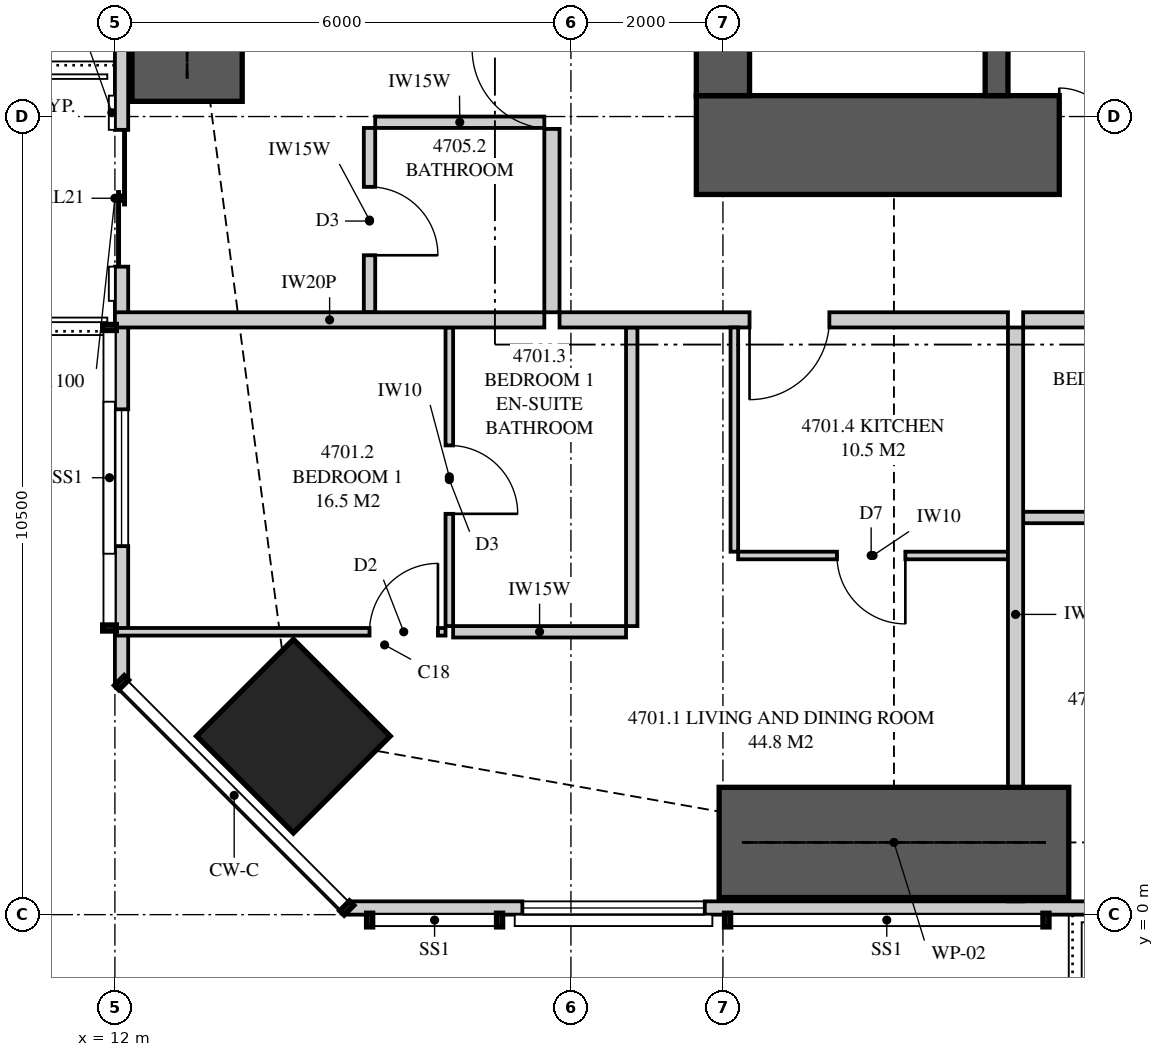
"""IFC4 building model, lengths in metres.
Left out: names, types, materials, properties, quantities, classifications, styles, units other than length and angle.
Written with IfcOpenShell. Run it as: python <this file> out.ifc"""

import sys

from ifc_helpers import new_model, si_unit, direction, frame, frame_2d, origin, origin_2d, place, context, subcontext, project, spatial, polyline, rectangle, outline, extrude, element, fill, save


model = new_model("IFC4")
c1 = context("Model", 3, precision=1e-05, world=origin(), true_north=direction((0.0, 1.0)))
c2 = subcontext(c1, "Body", "Model", "MODEL_VIEW")
j1 = project(units=[si_unit("LENGTHUNIT", "METRE"), si_unit("PLANEANGLEUNIT", "RADIAN")], contexts=[c1])
p1 = place(None, origin())
s1 = spatial("IfcSite", under=j1, at=p1, CompositionType="ELEMENT")
p2 = place(p1, origin())
s2 = spatial("IfcBuilding", under=s1, at=p2, CompositionType="ELEMENT")
p3 = place(p2, frame((0.0, 0.0, 174.45)))
s3 = spatial("IfcBuildingStorey", under=s2, at=p3, CompositionType="ELEMENT", Elevation=174.45)
p4 = place(p3, frame((14.348, 2.348, 0.0), z_axis=(0.0, 0.0, 1.0), x_axis=(0.707106781187, 0.707106781187, 0.0)))
e1 = element("IfcColumn", 1, at=p4, inside=s3, PredefinedType="COLUMN", context=c2, shape_type="SweptSolid", body=[
    extrude(rectangle(XDim=1.8, YDim=1.8, at=origin_2d()), origin(), (0.0, 0.0, 1.0), 3.35),
])
p5 = place(p3, frame((19.65, 10.125, 0.0), z_axis=(0.0, 0.0, 1.0), x_axis=(1.0, 0.0, 0.0)))
e2 = element("IfcWall", 2, at=p5, inside=s3, PredefinedType="SHEAR", context=c2, shape_type="SweptSolid", body=[
    extrude(rectangle(XDim=6.35, YDim=1.3, at=frame_2d((3.175, 0.0))), origin(), (0.0, 0.0, 1.0), 3.35),
])
p6 = place(p5, frame((4.775, 0.0, 0.0)))
e3 = element("IfcOpeningElement", 3, at=p6, cuts=e2, PredefinedType="OPENING", context=c2, shape_type="SweptSolid", body=[
    extrude(rectangle(XDim=0.75, YDim=2.1, at=frame_2d((0.375, 1.05))), frame((0.0, 0.66, 0.0), z_axis=(0.0, -1.0, 0.0), x_axis=(1.0, 0.0, 0.0)), (0.0, 0.0, 1.0), 1.32),
])
p7 = place(p3, frame((20.0, 13.0, 0.0), z_axis=(0.0, 0.0, 1.0), x_axis=(0.0, -1.0, 0.0)))
e4 = element("IfcWall", 4, at=p7, inside=s3, PredefinedType="SHEAR", context=c2, shape_type="SweptSolid", body=[
    extrude(rectangle(XDim=2.225, YDim=0.7, at=frame_2d((1.113, 0.0))), origin(), (0.0, 0.0, 1.0), 3.35),
])
p8 = place(p3, frame((23.6, 10.775, 0.0), z_axis=(0.0, 0.0, 1.0), x_axis=(0.0, 1.0, 0.0)))
e5 = element("IfcWall", 5, at=p8, inside=s3, PredefinedType="SHEAR", context=c2, shape_type="SweptSolid", body=[
    extrude(rectangle(XDim=6.925, YDim=0.3, at=frame_2d((3.462, 0.0))), origin(), (0.0, 0.0, 1.0), 3.35),
])
p9 = place(p3, frame((15.051, 0.087, 0.0), z_axis=(0.0, 0.0, 1.0), x_axis=(1.0, 0.0, 0.0)))
e6 = element("IfcWall", 6, at=p9, inside=s3, PredefinedType="SOLIDWALL", context=c2, shape_type="SweptSolid", body=[
    extrude(outline(polyline([(0.0, 0.0), (34.897, 0.0), (34.897, 3.11), (27.91, 3.11), (27.91, 2.15), (27.836, 2.15), (27.836, 3.11), (27.699, 3.11), (27.699, 2.15), (7.199, 2.15), (7.199, 3.11), (7.062, 3.11), (7.062, 2.15), (6.987, 2.15), (6.987, 3.11), (0.0, 3.11), (0.0, 0.0)])), frame((0.0, 0.087, 0.0), z_axis=(0.0, -1.0, 0.0), x_axis=(1.0, 0.0, 0.0)), (0.0, 0.0, 1.0), 0.175),
])
p10 = place(p9, frame((2.31, 0.0, 0.4)))
e7 = element("IfcOpeningElement", 7, at=p10, cuts=e6, PredefinedType="OPENING", context=c2, shape_type="SweptSolid", body=[
    extrude(rectangle(XDim=2.4, YDim=1.7, at=frame_2d((1.2, 0.85))), frame((0.0, 0.097, 0.0), z_axis=(0.0, -1.0, 0.0), x_axis=(1.0, 0.0, 0.0)), (0.0, 0.0, 1.0), 0.195),
])
p11 = place(p9, frame((10.399, 0.0, 0.0)))
e8 = element("IfcOpeningElement", 8, at=p11, cuts=e6, PredefinedType="OPENING", context=c2, shape_type="SweptSolid", body=[
    extrude(rectangle(XDim=1.8, YDim=2.1, at=frame_2d((0.9, 1.05))), frame((0.0, 0.097, 0.0), z_axis=(0.0, -1.0, 0.0), x_axis=(1.0, 0.0, 0.0)), (0.0, 0.0, 1.0), 0.195),
])
p12 = place(p9, frame((12.649, 0.0, 0.4)))
e9 = element("IfcOpeningElement", 9, at=p12, cuts=e6, PredefinedType="OPENING", context=c2, shape_type="SweptSolid", body=[
    extrude(rectangle(XDim=2.4, YDim=1.7, at=frame_2d((1.2, 0.85))), frame((0.0, 0.097, 0.0), z_axis=(0.0, -1.0, 0.0), x_axis=(1.0, 0.0, 0.0)), (0.0, 0.0, 1.0), 0.195),
])
p13 = place(p9, frame((19.874, 0.0, 0.4)))
e10 = element("IfcOpeningElement", 10, at=p13, cuts=e6, PredefinedType="OPENING", context=c2, shape_type="SweptSolid", body=[
    extrude(rectangle(XDim=1.8, YDim=1.7, at=frame_2d((0.9, 0.85))), frame((0.0, 0.097, 0.0), z_axis=(0.0, -1.0, 0.0), x_axis=(1.0, 0.0, 0.0)), (0.0, 0.0, 1.0), 0.195),
])
p14 = place(p9, frame((22.799, 0.0, 0.0)))
e11 = element("IfcOpeningElement", 11, at=p14, cuts=e6, PredefinedType="OPENING", context=c2, shape_type="SweptSolid", body=[
    extrude(rectangle(XDim=1.8, YDim=2.1, at=frame_2d((0.9, 1.05))), frame((0.0, 0.097, 0.0), z_axis=(0.0, -1.0, 0.0), x_axis=(1.0, 0.0, 0.0)), (0.0, 0.0, 1.0), 0.195),
])
p15 = place(p9, frame((30.205, 0.0, 0.4)))
e12 = element("IfcOpeningElement", 12, at=p15, cuts=e6, PredefinedType="OPENING", context=c2, shape_type="SweptSolid", body=[
    extrude(rectangle(XDim=2.4, YDim=1.7, at=frame_2d((1.2, 0.85))), frame((0.0, 0.097, 0.0), z_axis=(0.0, -1.0, 0.0), x_axis=(1.0, 0.0, 0.0)), (0.0, 0.0, 1.0), 0.195),
])
p16 = place(p3, frame((12.087, 32.949, 0.0), z_axis=(0.0, 0.0, 1.0), x_axis=(0.0, -1.0, 0.0)))
e13 = element("IfcWall", 13, at=p16, inside=s3, PredefinedType="SOLIDWALL", context=c2, shape_type="SweptSolid", body=[
    extrude(outline(polyline([(0.0, 0.0), (29.897, 0.0), (29.897, 3.11), (20.191, 3.11), (20.191, 2.15), (20.051, 2.15), (20.051, 3.11), (19.949, 3.11), (19.949, 2.15), (7.949, 2.15), (7.949, 3.11), (7.823, 3.11), (7.823, 2.15), (7.73, 2.15), (7.73, 3.11), (0.0, 3.11), (0.0, 0.0)])), frame((0.0, 0.087, 0.0), z_axis=(0.0, -1.0, 0.0), x_axis=(1.0, 0.0, 0.0)), (0.0, 0.0, 1.0), 0.175),
])
p17 = place(p16, frame((1.237, 0.0, 0.4)))
e14 = element("IfcOpeningElement", 14, at=p17, cuts=e13, PredefinedType="OPENING", context=c2, shape_type="SweptSolid", body=[
    extrude(rectangle(XDim=1.2, YDim=1.7, at=frame_2d((0.6, 0.85))), frame((0.0, 0.097, 0.0), z_axis=(0.0, -1.0, 0.0), x_axis=(1.0, 0.0, 0.0)), (0.0, 0.0, 1.0), 0.195),
])
p18 = place(p16, frame((10.482, 0.0, 0.4)))
e15 = element("IfcOpeningElement", 15, at=p18, cuts=e13, PredefinedType="OPENING", context=c2, shape_type="SweptSolid", body=[
    extrude(rectangle(XDim=2.4, YDim=1.7, at=frame_2d((1.2, 0.85))), frame((0.0, 0.097, 0.0), z_axis=(0.0, -1.0, 0.0), x_axis=(1.0, 0.0, 0.0)), (0.0, 0.0, 1.0), 0.195),
])
p19 = place(p16, frame((15.735, 0.0, 0.4)))
e16 = element("IfcOpeningElement", 16, at=p19, cuts=e13, PredefinedType="OPENING", context=c2, shape_type="SweptSolid", body=[
    extrude(rectangle(XDim=1.8, YDim=1.7, at=frame_2d((0.9, 0.85))), frame((0.0, 0.097, 0.0), z_axis=(0.0, -1.0, 0.0), x_axis=(1.0, 0.0, 0.0)), (0.0, 0.0, 1.0), 0.195),
])
p20 = place(p16, frame((22.624, 0.0, 0.0)))
e17 = element("IfcOpeningElement", 17, at=p20, cuts=e13, PredefinedType="OPENING", context=c2, shape_type="SweptSolid", body=[
    extrude(rectangle(XDim=1.8, YDim=2.1, at=frame_2d((0.9, 1.05))), frame((0.0, 0.097, 0.0), z_axis=(0.0, -1.0, 0.0), x_axis=(1.0, 0.0, 0.0)), (0.0, 0.0, 1.0), 0.195),
])
p21 = place(p16, frame((26.301, 0.0, 0.4)))
e18 = element("IfcOpeningElement", 18, at=p21, cuts=e13, PredefinedType="OPENING", context=c2, shape_type="SweptSolid", body=[
    extrude(rectangle(XDim=1.8, YDim=1.7, at=frame_2d((0.9, 0.85))), frame((0.0, 0.097, 0.0), z_axis=(0.0, -1.0, 0.0), x_axis=(1.0, 0.0, 0.0)), (0.0, 0.0, 1.0), 0.195),
])
p22 = place(p3, frame((23.85, 0.175, 0.0), z_axis=(0.0, 0.0, 1.0), x_axis=(0.0, 1.0, 0.0)))
e19 = element("IfcWall", 19, at=p22, inside=s3, PredefinedType="PARTITIONING", context=c2, shape_type="SweptSolid", body=[
    extrude(outline(polyline([(0.529, 2.15), (0.0, 2.15), (0.0, 0.0), (0.529, 0.0), (0.529, 0.207), (1.021, 0.207), (1.021, 0.0), (7.55, 0.0), (7.55, 3.11), (1.685, 3.11), (1.685, 2.15), (1.021, 2.15), (1.021, 1.944), (0.529, 1.944), (0.529, 2.15)])), frame((0.0, 0.1, 0.0), z_axis=(0.0, -1.0, 0.0), x_axis=(1.0, 0.0, 0.0)), (0.0, 0.0, 1.0), 0.2),
])
p23 = place(p3, frame((17.85, 7.825, 0.0), z_axis=(0.0, 0.0, 1.0), x_axis=(1.0, 0.0, 0.0)))
e20 = element("IfcWall", 20, at=p23, inside=s3, PredefinedType="PARTITIONING", context=c2, shape_type="SweptSolid", body=[
    extrude(outline(polyline([(0.0, 0.0), (5.9, 0.0), (5.9, 3.11), (4.737, 3.11), (4.737, 2.541), (4.062, 2.541), (4.062, 3.11), (0.0, 3.11), (0.0, 0.0)])), frame((0.0, 0.1, 0.0), z_axis=(0.0, -1.0, 0.0), x_axis=(1.0, 0.0, 0.0)), (0.0, 0.0, 1.0), 0.2),
])
p24 = place(p23, frame((2.5, 0.0, 0.0)))
e21 = element("IfcOpeningElement", 21, at=p24, cuts=e20, PredefinedType="OPENING", context=c2, shape_type="SweptSolid", body=[
    extrude(rectangle(XDim=1.05, YDim=2.2, at=frame_2d((0.525, 1.1))), frame((0.0, 0.11, 0.0), z_axis=(0.0, -1.0, 0.0), x_axis=(1.0, 0.0, 0.0)), (0.0, 0.0, 1.0), 0.22),
])
p25 = place(p3, frame((16.4, 3.796, 0.0), z_axis=(0.0, 0.0, 1.0), x_axis=(0.0, 1.0, 0.0)))
e22 = element("IfcWall", 22, at=p25, inside=s3, PredefinedType="PARTITIONING", context=c2, shape_type="SweptSolid", body=[
    extrude(rectangle(XDim=3.929, YDim=0.1, at=frame_2d((1.964, 0.0))), origin(), (0.0, 0.0, 1.0), 3.11),
])
p26 = place(p25, frame((1.477, 0.0, 0.0)))
e23 = element("IfcOpeningElement", 23, at=p26, cuts=e22, PredefinedType="OPENING", context=c2, shape_type="SweptSolid", body=[
    extrude(rectangle(XDim=0.9, YDim=2.1, at=frame_2d((0.45, 1.05))), frame((0.0, 0.06, 0.0), z_axis=(0.0, -1.0, 0.0), x_axis=(1.0, 0.0, 0.0)), (0.0, 0.0, 1.0), 0.12),
])
p27 = place(p3, frame((16.35, 3.721, 0.0), z_axis=(0.0, 0.0, 1.0), x_axis=(-1.0, 0.0, 0.0)))
e24 = element("IfcWall", 24, at=p27, inside=s3, PredefinedType="PARTITIONING", context=c2, shape_type="SweptSolid", body=[
    extrude(outline(polyline([(0.0, 0.0), (4.35, 0.0), (4.35, 3.11), (3.049, 3.11), (3.049, 2.15), (1.314, 2.15), (1.314, 3.11), (0.0, 3.11), (0.0, 0.0)])), frame((0.0, 0.05, 0.0), z_axis=(0.0, -1.0, 0.0), x_axis=(1.0, 0.0, 0.0)), (0.0, 0.0, 1.0), 0.1),
])
p28 = place(p27, frame((0.1, 0.0, 0.0)))
e25 = element("IfcOpeningElement", 25, at=p28, cuts=e24, PredefinedType="OPENING", context=c2, shape_type="SweptSolid", body=[
    extrude(rectangle(XDim=0.9, YDim=2.1, at=frame_2d((0.45, 1.05))), frame((0.0, 0.06, 0.0), z_axis=(0.0, -1.0, 0.0), x_axis=(1.0, 0.0, 0.0)), (0.0, 0.0, 1.0), 0.12),
])
p29 = place(p3, frame((18.725, 3.721, 0.0), z_axis=(0.0, 0.0, 1.0), x_axis=(-1.0, 0.0, 0.0)))
e26 = element("IfcWall", 26, at=p29, inside=s3, PredefinedType="PLUMBINGWALL", context=c2, shape_type="SweptSolid", body=[
    extrude(rectangle(XDim=2.275, YDim=0.15, at=frame_2d((1.138, 0.0))), origin(), (0.0, 0.0, 1.0), 3.11),
])
p30 = place(p3, frame((18.8, 3.796, 0.0), z_axis=(0.0, 0.0, 1.0), x_axis=(0.0, 1.0, 0.0)))
e27 = element("IfcWall", 27, at=p30, inside=s3, PredefinedType="PLUMBINGWALL", context=c2, shape_type="SweptSolid", body=[
    extrude(rectangle(XDim=3.929, YDim=0.15, at=frame_2d((1.964, 0.0))), origin(), (0.0, 0.0, 1.0), 3.11),
])
p31 = place(p3, frame((20.2, 4.725, 0.0), z_axis=(0.0, 0.0, 1.0), x_axis=(1.0, 0.0, 0.0)))
e28 = element("IfcWall", 28, at=p31, inside=s3, PredefinedType="PARTITIONING", context=c2, shape_type="SweptSolid", body=[
    extrude(outline(polyline([(0.0, 0.0), (3.55, 0.0), (3.55, 3.11), (2.337, 3.11), (2.337, 2.541), (1.763, 2.541), (1.763, 3.11), (0.0, 3.11), (0.0, 0.0)])), frame((0.0, 0.05, 0.0), z_axis=(0.0, -1.0, 0.0), x_axis=(1.0, 0.0, 0.0)), (0.0, 0.0, 1.0), 0.1),
])
p32 = place(p31, frame((1.3, 0.0, 0.0)))
e29 = element("IfcOpeningElement", 29, at=p32, cuts=e28, PredefinedType="OPENING", context=c2, shape_type="SweptSolid", body=[
    extrude(rectangle(XDim=0.9, YDim=2.1, at=frame_2d((0.45, 1.05))), frame((0.0, 0.06, 0.0), z_axis=(0.0, -1.0, 0.0), x_axis=(1.0, 0.0, 0.0)), (0.0, 0.0, 1.0), 0.12),
])
p33 = place(p3, frame((20.15, 4.775, 0.0), z_axis=(0.0, 0.0, 1.0), x_axis=(0.0, 1.0, 0.0)))
e30 = element("IfcWall", 30, at=p33, inside=s3, PredefinedType="PARTITIONING", context=c2, shape_type="SweptSolid", body=[
    extrude(rectangle(XDim=2.95, YDim=0.1, at=frame_2d((1.475, 0.0))), origin(), (0.0, 0.0, 1.0), 3.11),
])
p34 = place(p3, frame((23.95, 7.825, 0.0), z_axis=(0.0, 0.0, 1.0), x_axis=(1.0, 0.0, 0.0)))
e31 = element("IfcWall", 31, at=p34, inside=s3, PredefinedType="PARTITIONING", context=c2, shape_type="SweptSolid", body=[
    extrude(rectangle(XDim=7.375, YDim=0.2, at=frame_2d((3.688, 0.0))), origin(), (0.0, 0.0, 1.0), 3.11),
])
p35 = place(p3, frame((23.95, 5.225, 0.0), z_axis=(0.0, 0.0, 1.0), x_axis=(1.0, 0.0, 0.0)))
e32 = element("IfcWall", 32, at=p35, inside=s3, PredefinedType="PLUMBINGWALL", context=c2, shape_type="SweptSolid", body=[
    extrude(rectangle(XDim=3.45, YDim=0.15, at=frame_2d((1.725, 0.0))), origin(), (0.0, 0.0, 1.0), 3.11),
])
p36 = place(p35, frame((2.15, 0.0, 0.0)))
e33 = element("IfcOpeningElement", 33, at=p36, cuts=e32, PredefinedType="OPENING", context=c2, shape_type="SweptSolid", body=[
    extrude(rectangle(XDim=0.9, YDim=2.1, at=frame_2d((0.45, 1.05))), frame((0.0, 0.085, 0.0), z_axis=(0.0, -1.0, 0.0), x_axis=(1.0, 0.0, 0.0)), (0.0, 0.0, 1.0), 0.17),
])
p37 = place(p3, frame((12.0, 7.825, 0.0), z_axis=(0.0, 0.0, 1.0), x_axis=(1.0, 0.0, 0.0)))
e34 = element("IfcWall", 34, at=p37, inside=s3, PredefinedType="PARTITIONING", context=c2, shape_type="SweptSolid", body=[
    extrude(outline(polyline([(0.0, 0.0), (5.65, 0.0), (5.65, 3.11), (2.547, 3.11), (2.547, 2.15), (0.712, 2.15), (0.712, 3.11), (0.0, 3.11), (0.0, 0.0)])), frame((0.0, 0.1, 0.0), z_axis=(0.0, -1.0, 0.0), x_axis=(1.0, 0.0, 0.0)), (0.0, 0.0, 1.0), 0.2),
])
p38 = place(p3, frame((17.75, 7.925, 0.0), z_axis=(0.0, 0.0, 1.0), x_axis=(0.0, 1.0, 0.0)))
e35 = element("IfcWall", 35, at=p38, inside=s3, PredefinedType="PARTITIONING", context=c2, shape_type="SweptSolid", body=[
    extrude(outline(polyline([(0.0, 0.0), (5.825, 0.0), (5.825, 3.11), (5.412, 3.11), (5.412, 2.541), (4.738, 2.541), (4.738, 3.11), (0.0, 3.11), (0.0, 0.0)])), frame((0.0, 0.1, 0.0), z_axis=(0.0, -1.0, 0.0), x_axis=(1.0, 0.0, 0.0)), (0.0, 0.0, 1.0), 0.2),
])
p39 = place(p38, frame((2.413, 0.0, 0.0)))
e36 = element("IfcOpeningElement", 36, at=p39, cuts=e35, PredefinedType="OPENING", context=c2, shape_type="SweptSolid", body=[
    extrude(rectangle(XDim=1.05, YDim=2.2, at=frame_2d((0.525, 1.1))), frame((0.0, 0.11, 0.0), z_axis=(0.0, -1.0, 0.0), x_axis=(1.0, 0.0, 0.0)), (0.0, 0.0, 1.0), 0.22),
])
p40 = place(p3, frame((15.35, 7.925, 0.0), z_axis=(0.0, 0.0, 1.0), x_axis=(0.0, 1.0, 0.0)))
e37 = element("IfcWall", 37, at=p40, inside=s3, PredefinedType="PLUMBINGWALL", context=c2, shape_type="SweptSolid", body=[
    extrude(rectangle(XDim=2.425, YDim=0.15, at=frame_2d((1.212, 0.0))), origin(), (0.0, 0.0, 1.0), 3.11),
])
p41 = place(p40, frame((0.75, 0.0, 0.0)))
e38 = element("IfcOpeningElement", 38, at=p41, cuts=e37, PredefinedType="OPENING", context=c2, shape_type="SweptSolid", body=[
    extrude(rectangle(XDim=0.9, YDim=2.1, at=frame_2d((0.45, 1.05))), frame((0.0, 0.085, 0.0), z_axis=(0.0, -1.0, 0.0), x_axis=(1.0, 0.0, 0.0)), (0.0, 0.0, 1.0), 0.17),
])
p42 = place(p3, frame((15.425, 10.425, 0.0), z_axis=(0.0, 0.0, 1.0), x_axis=(1.0, 0.0, 0.0)))
e39 = element("IfcWall", 39, at=p42, inside=s3, PredefinedType="PLUMBINGWALL", context=c2, shape_type="SweptSolid", body=[
    extrude(rectangle(XDim=2.225, YDim=0.15, at=frame_2d((1.112, 0.0))), origin(), (0.0, 0.0, 1.0), 3.11),
])
for number, where, z_axis, x_axis in (
    (40, (19.95, 0.95, 0.0), (0.0, 0.0, 1.0), (1.0, 0.0, 0.0)),
    (41, (12.95, 10.7, 0.0), (0.0, 0.0, 1.0), (0.0, 1.0, 0.0)),
):
    element("IfcWall", number, at=place(p3, frame(where, z_axis=z_axis, x_axis=x_axis)), inside=s3, PredefinedType="SHEAR", context=c2, shape_type="SweptSolid", body=[
        extrude(rectangle(XDim=4.6, YDim=1.45, at=frame_2d((2.3, 0.0))), origin(), (0.0, 0.0, 1.0), 3.35),
    ])
p43 = place(p10, origin())
e42 = element("IfcWindow", 42, at=p43, inside=s3, PartitioningType="SINGLE_PANEL", PredefinedType="WINDOW", context=c2, shape_type="SweptSolid", body=[
    extrude(rectangle(XDim=2.4, YDim=1.7, at=frame_2d((1.2, 0.85))), frame((0.0, 0.03, 0.0), z_axis=(0.0, -1.0, 0.0), x_axis=(1.0, 0.0, 0.0)), (0.0, 0.0, 1.0), 0.06),
])
fill(e7, e42)
p44 = place(p20, origin())
e43 = element("IfcDoor", 43, at=p44, inside=s3, OperationType="SLIDING_TO_LEFT", PredefinedType="DOOR", context=c2, shape_type="SweptSolid", body=[
    extrude(rectangle(XDim=1.8, YDim=2.1, at=frame_2d((0.9, 1.05))), frame((0.0, 0.025, 0.0), z_axis=(0.0, -1.0, 0.0), x_axis=(1.0, 0.0, 0.0)), (0.0, 0.0, 1.0), 0.05),
])
fill(e17, e43)
p45 = place(p21, origin())
e44 = element("IfcWindow", 44, at=p45, inside=s3, PartitioningType="SINGLE_PANEL", PredefinedType="WINDOW", context=c2, shape_type="SweptSolid", body=[
    extrude(rectangle(XDim=1.8, YDim=1.7, at=frame_2d((0.9, 0.85))), frame((0.0, 0.03, 0.0), z_axis=(0.0, -1.0, 0.0), x_axis=(1.0, 0.0, 0.0)), (0.0, 0.0, 1.0), 0.06),
])
fill(e18, e44)
p46 = place(p24, frame((1.05, 0.0, 0.0), z_axis=(0.0, 0.0, 1.0), x_axis=(-1.0, 0.0, 0.0)))
e45 = element("IfcDoor", 45, at=p46, inside=s3, OperationType="SINGLE_SWING_RIGHT", PredefinedType="DOOR", context=c2, shape_type="SweptSolid", body=[
    extrude(rectangle(XDim=1.05, YDim=2.2, at=frame_2d((0.525, 1.1))), frame((0.0, 0.025, 0.0), z_axis=(0.0, -1.0, 0.0), x_axis=(1.0, 0.0, 0.0)), (0.0, 0.0, 1.0), 0.05),
])
fill(e21, e45)
p47 = place(p28, frame((0.9, 0.0, 0.0), z_axis=(0.0, 0.0, 1.0), x_axis=(-1.0, 0.0, 0.0)))
e46 = element("IfcDoor", 46, at=p47, inside=s3, OperationType="SINGLE_SWING_RIGHT", PredefinedType="DOOR", context=c2, shape_type="SweptSolid", body=[
    extrude(rectangle(XDim=0.9, YDim=2.1, at=frame_2d((0.45, 1.05))), frame((0.0, 0.025, 0.0), z_axis=(0.0, -1.0, 0.0), x_axis=(1.0, 0.0, 0.0)), (0.0, 0.0, 1.0), 0.05),
])
fill(e25, e46)
p48 = place(p26, frame((0.9, 0.0, 0.0), z_axis=(0.0, 0.0, 1.0), x_axis=(-1.0, 0.0, 0.0)))
e47 = element("IfcDoor", 47, at=p48, inside=s3, OperationType="SINGLE_SWING_RIGHT", PredefinedType="DOOR", context=c2, shape_type="SweptSolid", body=[
    extrude(rectangle(XDim=0.9, YDim=2.1, at=frame_2d((0.45, 1.05))), frame((0.0, 0.025, 0.0), z_axis=(0.0, -1.0, 0.0), x_axis=(1.0, 0.0, 0.0)), (0.0, 0.0, 1.0), 0.05),
])
fill(e23, e47)
p49 = place(p32, frame((0.9, 0.0, 0.0), z_axis=(0.0, 0.0, 1.0), x_axis=(-1.0, 0.0, 0.0)))
e48 = element("IfcDoor", 48, at=p49, inside=s3, OperationType="SINGLE_SWING_LEFT", PredefinedType="DOOR", context=c2, shape_type="SweptSolid", body=[
    extrude(rectangle(XDim=0.9, YDim=2.1, at=frame_2d((0.45, 1.05))), frame((0.0, 0.025, 0.0), z_axis=(0.0, -1.0, 0.0), x_axis=(1.0, 0.0, 0.0)), (0.0, 0.0, 1.0), 0.05),
])
fill(e29, e48)
p50 = place(p39, origin())
e49 = element("IfcDoor", 49, at=p50, inside=s3, OperationType="SINGLE_SWING_RIGHT", PredefinedType="DOOR", context=c2, shape_type="SweptSolid", body=[
    extrude(rectangle(XDim=1.05, YDim=2.2, at=frame_2d((0.525, 1.1))), frame((0.0, 0.025, 0.0), z_axis=(0.0, -1.0, 0.0), x_axis=(1.0, 0.0, 0.0)), (0.0, 0.0, 1.0), 0.05),
])
fill(e36, e49)
p51 = place(p41, frame((0.9, 0.0, 0.0), z_axis=(0.0, 0.0, 1.0), x_axis=(-1.0, 0.0, 0.0)))
e50 = element("IfcDoor", 50, at=p51, inside=s3, OperationType="SINGLE_SWING_RIGHT", PredefinedType="DOOR", context=c2, shape_type="SweptSolid", body=[
    extrude(rectangle(XDim=0.9, YDim=2.1, at=frame_2d((0.45, 1.05))), frame((0.0, 0.025, 0.0), z_axis=(0.0, -1.0, 0.0), x_axis=(1.0, 0.0, 0.0)), (0.0, 0.0, 1.0), 0.05),
])
fill(e38, e50)
p52 = place(p6, origin())
e51 = element("IfcDoor", 51, at=p52, inside=s3, OperationType="SINGLE_SWING_LEFT", PredefinedType="DOOR", context=c2, shape_type="SweptSolid", body=[
    extrude(rectangle(XDim=0.75, YDim=2.1, at=frame_2d((0.375, 1.05))), frame((0.0, 0.025, 0.0), z_axis=(0.0, -1.0, 0.0), x_axis=(1.0, 0.0, 0.0)), (0.0, 0.0, 1.0), 0.05),
])
fill(e3, e51)
save(model, sys.argv[1])
